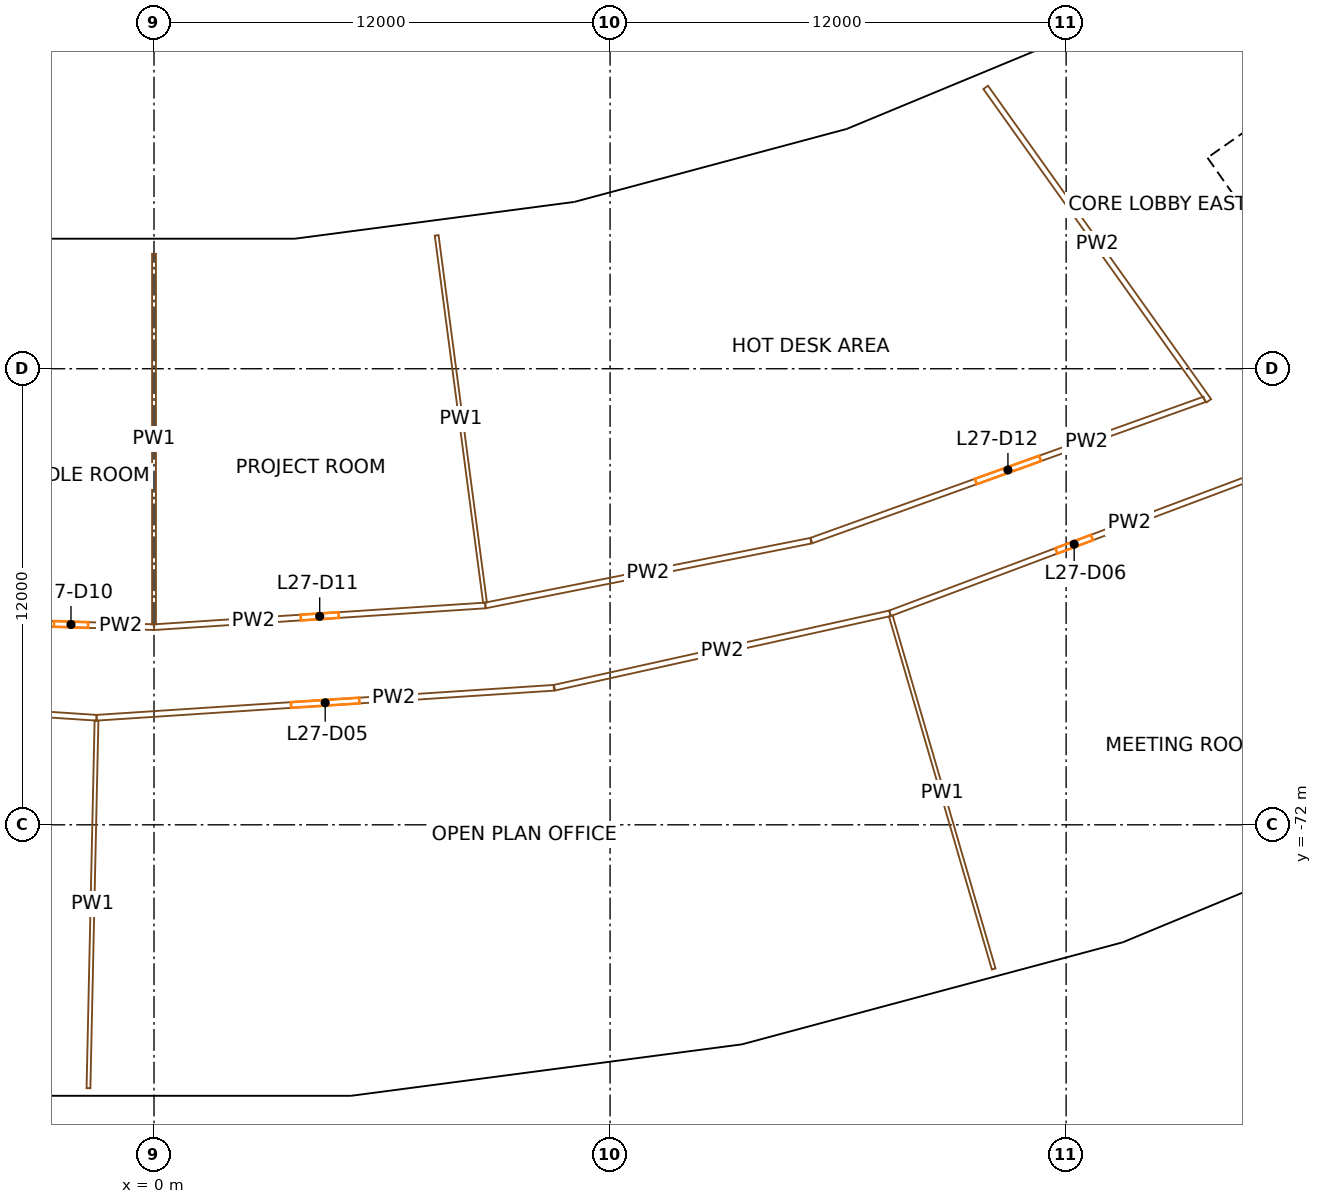
"""IFC4 building model, lengths in metres.
Left out: names, types, materials, properties, quantities, classifications, styles, units other than length and angle.
Written with IfcOpenShell. Run it as: python <this file> out.ifc"""

import sys

from ifc_helpers import new_model, si_unit, direction, frame, frame_2d, origin, origin_2d, place, context, subcontext, project, spatial, rectangle, extrude, element, fill, save


model = new_model("IFC4")
c1 = context("Model", 3, precision=1e-05, world=origin(), true_north=direction((0.0, 1.0)))
c2 = subcontext(c1, "Body", "Model", "MODEL_VIEW")
j1 = project(units=[si_unit("LENGTHUNIT", "METRE"), si_unit("PLANEANGLEUNIT", "RADIAN")], contexts=[c1])
p1 = place(None, origin())
s1 = spatial("IfcSite", under=j1, at=p1, CompositionType="ELEMENT")
p2 = place(p1, origin())
s2 = spatial("IfcBuilding", under=s1, at=p2, CompositionType="ELEMENT")
p3 = place(p2, frame((0.0, 0.0, 121.5)))
s3 = spatial("IfcBuildingStorey", under=s2, at=p3, CompositionType="ELEMENT", Elevation=121.5)
for number, where, z_axis, x_axis in (
    (1, (3.81, -58.125, 0.0), (0.0, 0.0, 1.0), (0.998, 0.065, 0.0)),
    (2, (5.085, -77.583, 0.0), (0.0, 0.0, 1.0), (0.998, 0.065, 0.0)),
    (3, (11.364, -57.131, 0.0), (0.0, 0.0, 1.0), (0.981, 0.195, 0.0)),
    (4, (15.168, -76.256, 0.0), (0.0, 0.0, 1.0), (0.981, 0.195, 0.0)),
    (5, (18.724, -55.159, 0.0), (0.0, 0.0, 1.0), (0.947, 0.321, 0.0)),
    (6, (24.992, -73.624, 0.0), (0.0, 0.0, 1.0), (0.947, 0.321, 0.0)),
    (7, (25.763, -52.243, 0.0), (0.0, 0.0, 1.0), (0.897, 0.442, 0.0)),
):
    element("IfcColumn", number, at=place(p3, frame(where, z_axis=z_axis, x_axis=x_axis)), inside=s3, PredefinedType="COLUMN", context=c2, shape_type="SweptSolid", body=[
        extrude(rectangle(XDim=1.2, YDim=1.5, at=origin_2d()), origin(), (0.0, 0.0, 1.0), 3.8),
    ])
p4 = place(p3, frame((36.717, -66.337, 0.0), z_axis=(0.0, 0.0, 1.0), x_axis=(-0.573577477574, 0.819151315216, 0.0)))
e8 = element("IfcWall", 8, at=p4, inside=s3, PredefinedType="SHEAR", context=c2, shape_type="SweptSolid", body=[
    extrude(rectangle(XDim=14.8, YDim=0.9, at=frame_2d((7.4, 0.0))), origin(), (0.0, 0.0, 1.0), 3.5),
])
p5 = place(p4, frame((6.2, 0.0, 0.0)))
e9 = element("IfcOpeningElement", 9, at=p5, cuts=e8, PredefinedType="OPENING", context=c2, shape_type="SweptSolid", body=[
    extrude(rectangle(XDim=2.4, YDim=2.1, at=frame_2d((1.2, 1.05))), frame((0.0, 0.46, 0.0), z_axis=(0.0, -1.0, 0.0), x_axis=(1.0, 0.0, 0.0)), (0.0, 0.0, 1.0), 0.92),
])
p6 = place(p3, frame((28.854, -54.324, 0.0), z_axis=(0.0, 0.0, 1.0), x_axis=(0.819145767589, 0.573585400304, 0.0)))
e10 = element("IfcWall", 10, at=p6, inside=s3, PredefinedType="SHEAR", context=c2, shape_type="SweptSolid", body=[
    extrude(rectangle(XDim=15.045, YDim=0.9, at=frame_2d((7.523, 0.0))), origin(), (0.0, 0.0, 1.0), 3.5),
])
p7 = place(p6, frame((0.6, 0.0, 0.0)))
e11 = element("IfcOpeningElement", 11, at=p7, cuts=e10, PredefinedType="OPENING", context=c2, shape_type="SweptSolid", body=[
    extrude(rectangle(XDim=1.0, YDim=2.1, at=frame_2d((0.5, 1.05))), frame((0.0, 0.46, 0.0), z_axis=(0.0, -1.0, 0.0), x_axis=(1.0, 0.0, 0.0)), (0.0, 0.0, 1.0), 0.92),
])
p8 = place(p6, frame((3.275, 0.0, 0.0)))
e12 = element("IfcOpeningElement", 12, at=p8, cuts=e10, PredefinedType="OPENING", context=c2, shape_type="SweptSolid", body=[
    extrude(rectangle(XDim=1.0, YDim=2.1, at=frame_2d((0.5, 1.05))), frame((0.0, 0.46, 0.0), z_axis=(0.0, -1.0, 0.0), x_axis=(1.0, 0.0, 0.0)), (0.0, 0.0, 1.0), 0.92),
])
p9 = place(p6, frame((6.225, 0.0, 0.0)))
e13 = element("IfcOpeningElement", 13, at=p9, cuts=e10, PredefinedType="OPENING", context=c2, shape_type="SweptSolid", body=[
    extrude(rectangle(XDim=0.9, YDim=2.1, at=frame_2d((0.45, 1.05))), frame((0.0, 0.46, 0.0), z_axis=(0.0, -1.0, 0.0), x_axis=(1.0, 0.0, 0.0)), (0.0, 0.0, 1.0), 0.92),
])
p10 = place(p6, frame((13.495, 0.0, 0.0)))
e14 = element("IfcOpeningElement", 14, at=p10, cuts=e10, PredefinedType="OPENING", context=c2, shape_type="SweptSolid", body=[
    extrude(rectangle(XDim=1.1, YDim=2.1, at=frame_2d((0.55, 1.05))), frame((0.0, 0.46, 0.0), z_axis=(0.0, -1.0, 0.0), x_axis=(1.0, 0.0, 0.0)), (0.0, 0.0, 1.0), 0.92),
])
p11 = place(p3, frame((11.125, -55.804, 0.0), z_axis=(0.0, 0.0, 1.0), x_axis=(-0.991444533306, -0.130528684121, 0.0)))
e15 = element("IfcWall", 15, at=p11, inside=s3, PredefinedType="SOLIDWALL", context=c2, shape_type="SweptSolid", body=[
    extrude(rectangle(XDim=7.493, YDim=0.4, at=frame_2d((3.747, 0.0))), origin(), (0.0, 0.0, 1.0), 2.7),
])
p12 = place(p11, frame((4.301, 0.0, 0.9)))
e16 = element("IfcOpeningElement", 16, at=p12, cuts=e15, PredefinedType="OPENING", context=c2, shape_type="SweptSolid", body=[
    extrude(rectangle(XDim=2.6, YDim=1.65, at=frame_2d((1.3, 0.825))), frame((0.0, 0.21, 0.0), z_axis=(0.0, -1.0, 0.0), x_axis=(1.0, 0.0, 0.0)), (0.0, 0.0, 1.0), 0.42),
])
p13 = place(p11, frame((0.592, 0.0, 0.9)))
e17 = element("IfcOpeningElement", 17, at=p13, cuts=e15, PredefinedType="OPENING", context=c2, shape_type="SweptSolid", body=[
    extrude(rectangle(XDim=2.6, YDim=1.65, at=frame_2d((1.3, 0.825))), frame((0.0, 0.21, 0.0), z_axis=(0.0, -1.0, 0.0), x_axis=(1.0, 0.0, 0.0)), (0.0, 0.0, 1.0), 0.42),
])
p14 = place(p3, frame((18.241, -53.894, 0.0), z_axis=(0.0, 0.0, 1.0), x_axis=(-0.965924597867, -0.258823629594, 0.0)))
e18 = element("IfcWall", 18, at=p14, inside=s3, PredefinedType="SOLIDWALL", context=c2, shape_type="SweptSolid", body=[
    extrude(rectangle(XDim=7.342, YDim=0.4, at=frame_2d((3.671, 0.0))), origin(), (0.0, 0.0, 1.0), 2.7),
])
p15 = place(p14, frame((4.225, 0.0, 0.9)))
e19 = element("IfcOpeningElement", 19, at=p15, cuts=e18, PredefinedType="OPENING", context=c2, shape_type="SweptSolid", body=[
    extrude(rectangle(XDim=2.6, YDim=1.65, at=frame_2d((1.3, 0.825))), frame((0.0, 0.21, 0.0), z_axis=(0.0, -1.0, 0.0), x_axis=(1.0, 0.0, 0.0)), (0.0, 0.0, 1.0), 0.42),
])
p16 = place(p14, frame((0.517, 0.0, 0.9)))
e20 = element("IfcOpeningElement", 20, at=p16, cuts=e18, PredefinedType="OPENING", context=c2, shape_type="SweptSolid", body=[
    extrude(rectangle(XDim=2.6, YDim=1.65, at=frame_2d((1.3, 0.825))), frame((0.0, 0.21, 0.0), z_axis=(0.0, -1.0, 0.0), x_axis=(1.0, 0.0, 0.0)), (0.0, 0.0, 1.0), 0.42),
])
p17 = place(p3, frame((25.189, -51.023, 0.0), z_axis=(0.0, 0.0, 1.0), x_axis=(-0.923879826967, -0.382682721486, 0.0)))
e21 = element("IfcWall", 21, at=p17, inside=s3, PredefinedType="SOLIDWALL", context=c2, shape_type="SweptSolid", body=[
    extrude(rectangle(XDim=7.493, YDim=0.4, at=frame_2d((3.747, 0.0))), origin(), (0.0, 0.0, 1.0), 2.7),
])
p18 = place(p17, frame((4.301, 0.0, 0.9)))
e22 = element("IfcOpeningElement", 22, at=p18, cuts=e21, PredefinedType="OPENING", context=c2, shape_type="SweptSolid", body=[
    extrude(rectangle(XDim=2.6, YDim=1.65, at=frame_2d((1.3, 0.825))), frame((0.0, 0.21, 0.0), z_axis=(0.0, -1.0, 0.0), x_axis=(1.0, 0.0, 0.0)), (0.0, 0.0, 1.0), 0.42),
])
p19 = place(p17, frame((0.592, 0.0, 0.9)))
e23 = element("IfcOpeningElement", 23, at=p19, cuts=e21, PredefinedType="OPENING", context=c2, shape_type="SweptSolid", body=[
    extrude(rectangle(XDim=2.6, YDim=1.65, at=frame_2d((1.3, 0.825))), frame((0.0, 0.21, 0.0), z_axis=(0.0, -1.0, 0.0), x_axis=(1.0, 0.0, 0.0)), (0.0, 0.0, 1.0), 0.42),
])
p20 = place(p3, frame((3.671, -56.779, 0.0), z_axis=(0.0, 0.0, 1.0), x_axis=(-1.0, 0.0, 0.0)))
e24 = element("IfcWall", 24, at=p20, inside=s3, PredefinedType="SOLIDWALL", context=c2, shape_type="SweptSolid", body=[
    extrude(rectangle(XDim=7.341, YDim=0.4, at=frame_2d((3.671, 0.0))), origin(), (0.0, 0.0, 1.0), 2.7),
])
p21 = place(p20, frame((4.225, 0.0, 0.9)))
e25 = element("IfcOpeningElement", 25, at=p21, cuts=e24, PredefinedType="OPENING", context=c2, shape_type="SweptSolid", body=[
    extrude(rectangle(XDim=2.6, YDim=1.65, at=frame_2d((1.3, 0.825))), frame((0.0, 0.21, 0.0), z_axis=(0.0, -1.0, 0.0), x_axis=(1.0, 0.0, 0.0)), (0.0, 0.0, 1.0), 0.42),
])
p22 = place(p20, frame((0.517, 0.0, 0.9)))
e26 = element("IfcOpeningElement", 26, at=p22, cuts=e24, PredefinedType="OPENING", context=c2, shape_type="SweptSolid", body=[
    extrude(rectangle(XDim=2.6, YDim=1.65, at=frame_2d((1.3, 0.825))), frame((0.0, 0.21, 0.0), z_axis=(0.0, -1.0, 0.0), x_axis=(1.0, 0.0, 0.0)), (0.0, 0.0, 1.0), 0.42),
])
p23 = place(p3, frame((-1.511, -69.184, 0.0), z_axis=(0.0, 0.0, 1.0), x_axis=(-0.997856905736, 0.065433903101, 0.0)))
e27 = element("IfcWall", 27, at=p23, inside=s3, PredefinedType="PARTITIONING", context=c2, shape_type="SweptSolid", body=[
    extrude(rectangle(XDim=6.033, YDim=0.15, at=frame_2d((3.017, 0.0))), origin(), (0.0, 0.0, 1.0), 2.4),
])
p24 = place(p23, frame((2.517, 0.0, 0.0)))
e28 = element("IfcOpeningElement", 28, at=p24, cuts=e27, PredefinedType="OPENING", context=c2, shape_type="SweptSolid", body=[
    extrude(rectangle(XDim=1.0, YDim=2.1, at=frame_2d((0.5, 1.05))), frame((0.0, 0.085, 0.0), z_axis=(0.0, -1.0, 0.0), x_axis=(1.0, 0.0, 0.0)), (0.0, 0.0, 1.0), 0.17),
])
p25 = place(p3, frame((-4.369, -66.657, 0.0), z_axis=(0.0, 0.0, 1.0), x_axis=(0.99946426167, -0.03272903366, 0.0)))
e29 = element("IfcWall", 29, at=p25, inside=s3, PredefinedType="PARTITIONING", context=c2, shape_type="SweptSolid", body=[
    extrude(rectangle(XDim=4.371, YDim=0.15, at=frame_2d((2.186, 0.0))), origin(), (0.0, 0.0, 1.0), 2.4),
])
p26 = place(p25, frame((1.736, 0.0, 0.0)))
e30 = element("IfcOpeningElement", 30, at=p26, cuts=e29, PredefinedType="OPENING", context=c2, shape_type="SweptSolid", body=[
    extrude(rectangle(XDim=0.9, YDim=2.1, at=frame_2d((0.45, 1.05))), frame((0.0, 0.085, 0.0), z_axis=(0.0, -1.0, 0.0), x_axis=(1.0, 0.0, 0.0)), (0.0, 0.0, 1.0), 0.17),
])
p27 = place(p3, frame((-1.724, -78.93, 0.0), z_axis=(0.0, 0.0, 1.0), x_axis=(0.021829960086, 0.999761698027, 0.0)))
e31 = element("IfcWall", 31, at=p27, inside=s3, PredefinedType="PARTITIONING", context=c2, shape_type="SweptSolid", body=[
    extrude(rectangle(XDim=9.674, YDim=0.1, at=frame_2d((4.837, 0.0))), origin(), (0.0, 0.0, 1.0), 2.4),
])
p28 = place(p3, frame((10.52, -68.395, 0.0), z_axis=(0.0, 0.0, 1.0), x_axis=(-0.997857664211, -0.065422335445, 0.0)))
e32 = element("IfcWall", 32, at=p28, inside=s3, PredefinedType="PARTITIONING", context=c2, shape_type="SweptSolid", body=[
    extrude(rectangle(XDim=12.057, YDim=0.15, at=frame_2d((6.029, 0.0))), origin(), (0.0, 0.0, 1.0), 2.4),
])
p29 = place(p28, frame((5.129, 0.0, 0.0)))
e33 = element("IfcOpeningElement", 33, at=p29, cuts=e32, PredefinedType="OPENING", context=c2, shape_type="SweptSolid", body=[
    extrude(rectangle(XDim=1.8, YDim=2.1, at=frame_2d((0.9, 1.05))), frame((0.0, 0.085, 0.0), z_axis=(0.0, -1.0, 0.0), x_axis=(1.0, 0.0, 0.0)), (0.0, 0.0, 1.0), 0.17),
])
p30 = place(p3, frame((0.0, -66.8, 0.0), z_axis=(0.0, 0.0, 1.0), x_axis=(0.997858593599, 0.065408158359, 0.0)))
e34 = element("IfcWall", 34, at=p30, inside=s3, PredefinedType="PARTITIONING", context=c2, shape_type="SweptSolid", body=[
    extrude(rectangle(XDim=8.738, YDim=0.15, at=frame_2d((4.369, 0.0))), origin(), (0.0, 0.0, 1.0), 2.4),
])
p31 = place(p30, frame((3.869, 0.0, 0.0)))
e35 = element("IfcOpeningElement", 35, at=p31, cuts=e34, PredefinedType="OPENING", context=c2, shape_type="SweptSolid", body=[
    extrude(rectangle(XDim=1.0, YDim=2.1, at=frame_2d((0.5, 1.05))), frame((0.0, 0.085, 0.0), z_axis=(0.0, -1.0, 0.0), x_axis=(1.0, 0.0, 0.0)), (0.0, 0.0, 1.0), 0.17),
])
p32 = place(p3, frame((0.0, -56.979, 0.0), z_axis=(0.0, 0.0, 1.0), x_axis=(0.0, -1.0, 0.0)))
e36 = element("IfcWall", 36, at=p32, inside=s3, PredefinedType="PARTITIONING", context=c2, shape_type="SweptSolid", body=[
    extrude(rectangle(XDim=9.747, YDim=0.1, at=frame_2d((4.873, 0.0))), origin(), (0.0, 0.0, 1.0), 2.4),
])
p33 = place(p3, frame((7.437, -56.491, 0.0), z_axis=(0.0, 0.0, 1.0), x_axis=(0.13053421433, -0.99144380521, 0.0)))
e37 = element("IfcWall", 37, at=p33, inside=s3, PredefinedType="PARTITIONING", context=c2, shape_type="SweptSolid", body=[
    extrude(rectangle(XDim=9.746, YDim=0.1, at=frame_2d((4.873, 0.0))), origin(), (0.0, 0.0, 1.0), 2.4),
])
p34 = place(p3, frame((8.719, -66.229, 0.0), z_axis=(0.0, 0.0, 1.0), x_axis=(0.980787736115, 0.195077975915, 0.0)))
e38 = element("IfcWall", 38, at=p34, inside=s3, PredefinedType="PARTITIONING", context=c2, shape_type="SweptSolid", body=[
    extrude(rectangle(XDim=8.729, YDim=0.15, at=frame_2d((4.365, 0.0))), origin(), (0.0, 0.0, 1.0), 2.4),
])
p35 = place(p3, frame((10.537, -68.392, 0.0), z_axis=(0.0, 0.0, 1.0), x_axis=(0.97628985912, 0.216467343909, 0.0)))
e39 = element("IfcWall", 39, at=p35, inside=s3, PredefinedType="PARTITIONING", context=c2, shape_type="SweptSolid", body=[
    extrude(rectangle(XDim=9.043, YDim=0.15, at=frame_2d((4.521, 0.0))), origin(), (0.0, 0.0, 1.0), 2.4),
])
p36 = place(p3, frame((17.297, -64.521, 0.0), z_axis=(0.0, 0.0, 1.0), x_axis=(0.941151914592, 0.337983836389, 0.0)))
e40 = element("IfcWall", 40, at=p36, inside=s3, PredefinedType="PARTITIONING", context=c2, shape_type="SweptSolid", body=[
    extrude(rectangle(XDim=10.99, YDim=0.15, at=frame_2d((5.495, 0.0))), origin(), (0.0, 0.0, 1.0), 2.4),
])
p37 = place(p36, frame((4.595, 0.0, 0.0)))
e41 = element("IfcOpeningElement", 41, at=p37, cuts=e40, PredefinedType="OPENING", context=c2, shape_type="SweptSolid", body=[
    extrude(rectangle(XDim=1.8, YDim=2.1, at=frame_2d((0.9, 1.05))), frame((0.0, 0.085, 0.0), z_axis=(0.0, -1.0, 0.0), x_axis=(1.0, 0.0, 0.0)), (0.0, 0.0, 1.0), 0.17),
])
p38 = place(p3, frame((29.057, -62.798, 0.0), z_axis=(0.0, 0.0, 1.0), x_axis=(-0.936236096431, -0.351371557956, 0.0)))
e42 = element("IfcWall", 42, at=p38, inside=s3, PredefinedType="PARTITIONING", context=c2, shape_type="SweptSolid", body=[
    extrude(rectangle(XDim=10.352, YDim=0.15, at=frame_2d((5.176, 0.0))), origin(), (0.0, 0.0, 1.0), 2.4),
])
p39 = place(p38, frame((4.676, 0.0, 0.0)))
e43 = element("IfcOpeningElement", 43, at=p39, cuts=e42, PredefinedType="OPENING", context=c2, shape_type="SweptSolid", body=[
    extrude(rectangle(XDim=1.0, YDim=2.1, at=frame_2d((0.5, 1.05))), frame((0.0, 0.085, 0.0), z_axis=(0.0, -1.0, 0.0), x_axis=(1.0, 0.0, 0.0)), (0.0, 0.0, 1.0), 0.17),
])
p40 = place(p3, frame((21.884, -52.598, 0.0), z_axis=(0.0, 0.0, 1.0), x_axis=(0.580016763963, -0.814604538118, 0.0)))
e44 = element("IfcWall", 44, at=p40, inside=s3, PredefinedType="PARTITIONING", context=c2, shape_type="SweptSolid", body=[
    extrude(rectangle(XDim=10.121, YDim=0.15, at=frame_2d((5.061, 0.0))), origin(), (0.0, 0.0, 1.0), 2.4),
])
p41 = place(p3, frame((22.094, -75.794, 0.0), z_axis=(0.0, 0.0, 1.0), x_axis=(-0.279846881911, 0.960044646194, 0.0)))
e45 = element("IfcWall", 45, at=p41, inside=s3, PredefinedType="PARTITIONING", context=c2, shape_type="SweptSolid", body=[
    extrude(rectangle(XDim=9.674, YDim=0.1, at=frame_2d((4.837, 0.0))), origin(), (0.0, 0.0, 1.0), 2.4),
])
p42 = place(p21, origin())
e46 = element("IfcWindow", 46, at=p42, inside=s3, PartitioningType="SINGLE_PANEL", PredefinedType="WINDOW", context=c2, shape_type="SweptSolid", body=[
    extrude(rectangle(XDim=2.6, YDim=1.65, at=frame_2d((1.3, 0.825))), frame((0.0, 0.03, 0.0), z_axis=(0.0, -1.0, 0.0), x_axis=(1.0, 0.0, 0.0)), (0.0, 0.0, 1.0), 0.06),
])
fill(e25, e46)
p43 = place(p22, origin())
e47 = element("IfcWindow", 47, at=p43, inside=s3, PartitioningType="SINGLE_PANEL", PredefinedType="WINDOW", context=c2, shape_type="SweptSolid", body=[
    extrude(rectangle(XDim=2.6, YDim=1.65, at=frame_2d((1.3, 0.825))), frame((0.0, 0.03, 0.0), z_axis=(0.0, -1.0, 0.0), x_axis=(1.0, 0.0, 0.0)), (0.0, 0.0, 1.0), 0.06),
])
fill(e26, e47)
p44 = place(p12, origin())
e48 = element("IfcWindow", 48, at=p44, inside=s3, PartitioningType="SINGLE_PANEL", PredefinedType="WINDOW", context=c2, shape_type="SweptSolid", body=[
    extrude(rectangle(XDim=2.6, YDim=1.65, at=frame_2d((1.3, 0.825))), frame((0.0, 0.03, 0.0), z_axis=(0.0, -1.0, 0.0), x_axis=(1.0, 0.0, 0.0)), (0.0, 0.0, 1.0), 0.06),
])
fill(e16, e48)
p45 = place(p13, origin())
e49 = element("IfcWindow", 49, at=p45, inside=s3, PartitioningType="SINGLE_PANEL", PredefinedType="WINDOW", context=c2, shape_type="SweptSolid", body=[
    extrude(rectangle(XDim=2.6, YDim=1.65, at=frame_2d((1.3, 0.825))), frame((0.0, 0.03, 0.0), z_axis=(0.0, -1.0, 0.0), x_axis=(1.0, 0.0, 0.0)), (0.0, 0.0, 1.0), 0.06),
])
fill(e17, e49)
p46 = place(p15, origin())
e50 = element("IfcWindow", 50, at=p46, inside=s3, PartitioningType="SINGLE_PANEL", PredefinedType="WINDOW", context=c2, shape_type="SweptSolid", body=[
    extrude(rectangle(XDim=2.6, YDim=1.65, at=frame_2d((1.3, 0.825))), frame((0.0, 0.03, 0.0), z_axis=(0.0, -1.0, 0.0), x_axis=(1.0, 0.0, 0.0)), (0.0, 0.0, 1.0), 0.06),
])
fill(e19, e50)
p47 = place(p16, origin())
e51 = element("IfcWindow", 51, at=p47, inside=s3, PartitioningType="SINGLE_PANEL", PredefinedType="WINDOW", context=c2, shape_type="SweptSolid", body=[
    extrude(rectangle(XDim=2.6, YDim=1.65, at=frame_2d((1.3, 0.825))), frame((0.0, 0.03, 0.0), z_axis=(0.0, -1.0, 0.0), x_axis=(1.0, 0.0, 0.0)), (0.0, 0.0, 1.0), 0.06),
])
fill(e20, e51)
p48 = place(p18, origin())
e52 = element("IfcWindow", 52, at=p48, inside=s3, PartitioningType="SINGLE_PANEL", PredefinedType="WINDOW", context=c2, shape_type="SweptSolid", body=[
    extrude(rectangle(XDim=2.6, YDim=1.65, at=frame_2d((1.3, 0.825))), frame((0.0, 0.03, 0.0), z_axis=(0.0, -1.0, 0.0), x_axis=(1.0, 0.0, 0.0)), (0.0, 0.0, 1.0), 0.06),
])
fill(e22, e52)
p49 = place(p19, origin())
e53 = element("IfcWindow", 53, at=p49, inside=s3, PartitioningType="SINGLE_PANEL", PredefinedType="WINDOW", context=c2, shape_type="SweptSolid", body=[
    extrude(rectangle(XDim=2.6, YDim=1.65, at=frame_2d((1.3, 0.825))), frame((0.0, 0.03, 0.0), z_axis=(0.0, -1.0, 0.0), x_axis=(1.0, 0.0, 0.0)), (0.0, 0.0, 1.0), 0.06),
])
fill(e23, e53)
p50 = place(p29, origin())
e54 = element("IfcDoor", 54, at=p50, inside=s3, OperationType="DOUBLE_DOOR_SINGLE_SWING", PredefinedType="DOOR", context=c2, shape_type="SweptSolid", body=[
    extrude(rectangle(XDim=1.8, YDim=2.1, at=frame_2d((0.9, 1.05))), frame((0.0, 0.025, 0.0), z_axis=(0.0, -1.0, 0.0), x_axis=(1.0, 0.0, 0.0)), (0.0, 0.0, 1.0), 0.05),
])
fill(e33, e54)
p51 = place(p39, origin())
e55 = element("IfcDoor", 55, at=p51, inside=s3, OperationType="SINGLE_SWING_RIGHT", PredefinedType="DOOR", context=c2, shape_type="SweptSolid", body=[
    extrude(rectangle(XDim=1.0, YDim=2.1, at=frame_2d((0.5, 1.05))), frame((0.0, 0.025, 0.0), z_axis=(0.0, -1.0, 0.0), x_axis=(1.0, 0.0, 0.0)), (0.0, 0.0, 1.0), 0.05),
])
fill(e43, e55)
p52 = place(p26, origin())
e56 = element("IfcDoor", 56, at=p52, inside=s3, OperationType="SINGLE_SWING_RIGHT", PredefinedType="DOOR", context=c2, shape_type="SweptSolid", body=[
    extrude(rectangle(XDim=0.9, YDim=2.1, at=frame_2d((0.45, 1.05))), frame((0.0, 0.025, 0.0), z_axis=(0.0, -1.0, 0.0), x_axis=(1.0, 0.0, 0.0)), (0.0, 0.0, 1.0), 0.05),
])
fill(e30, e56)
p53 = place(p31, origin())
e57 = element("IfcDoor", 57, at=p53, inside=s3, OperationType="SINGLE_SWING_RIGHT", PredefinedType="DOOR", context=c2, shape_type="SweptSolid", body=[
    extrude(rectangle(XDim=1.0, YDim=2.1, at=frame_2d((0.5, 1.05))), frame((0.0, 0.025, 0.0), z_axis=(0.0, -1.0, 0.0), x_axis=(1.0, 0.0, 0.0)), (0.0, 0.0, 1.0), 0.05),
])
fill(e35, e57)
p54 = place(p37, origin())
e58 = element("IfcDoor", 58, at=p54, inside=s3, OperationType="DOUBLE_DOOR_SINGLE_SWING", PredefinedType="DOOR", context=c2, shape_type="SweptSolid", body=[
    extrude(rectangle(XDim=1.8, YDim=2.1, at=frame_2d((0.9, 1.05))), frame((0.0, 0.025, 0.0), z_axis=(0.0, -1.0, 0.0), x_axis=(1.0, 0.0, 0.0)), (0.0, 0.0, 1.0), 0.05),
])
fill(e41, e58)
save(model, sys.argv[1])
